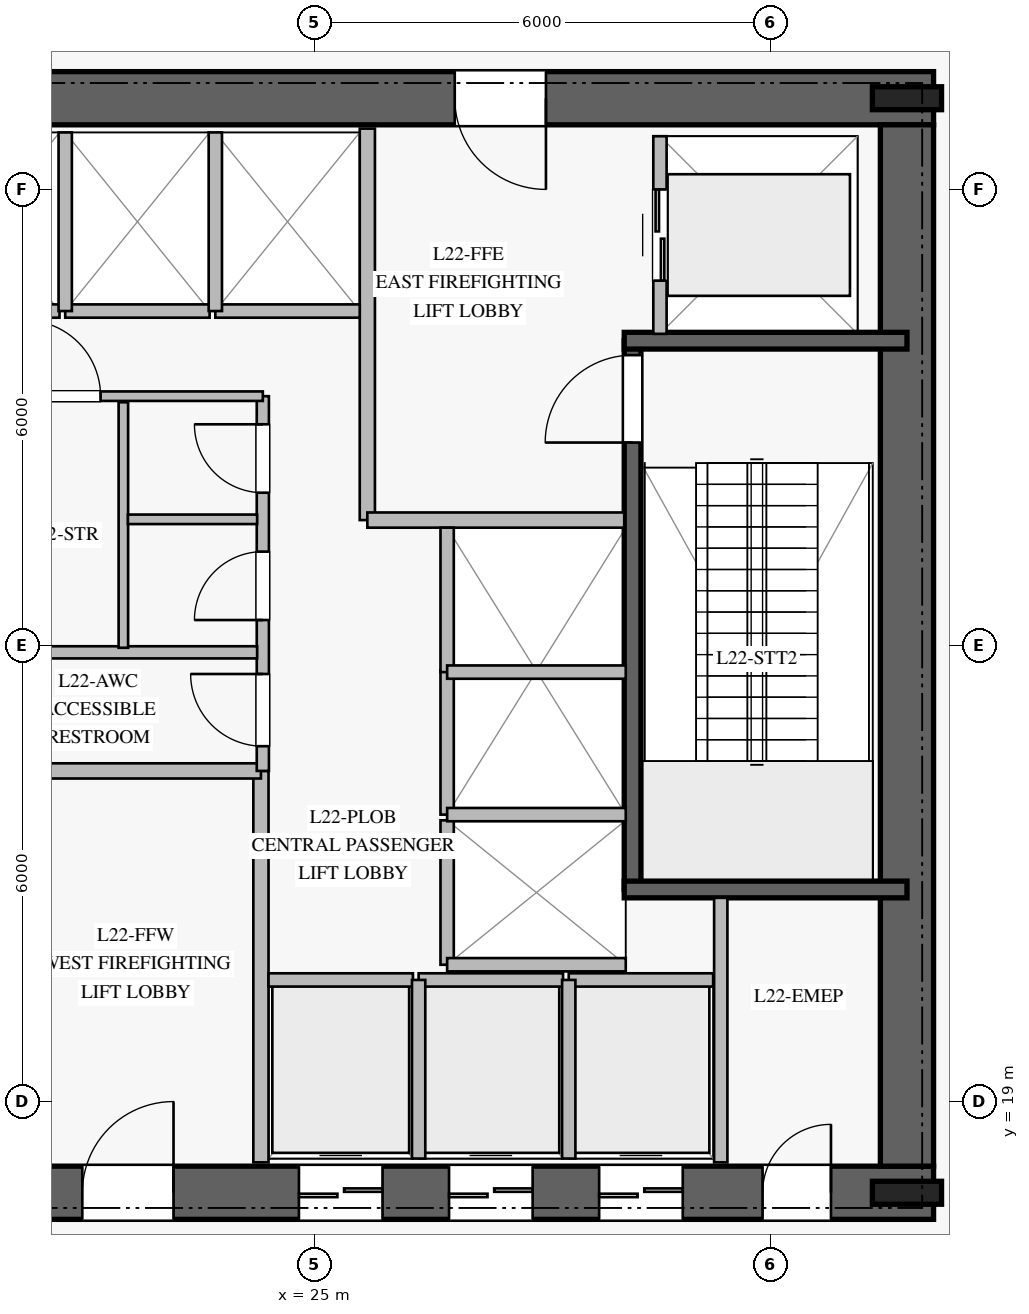
"""IFC4 building model, lengths in metres.
Left out: names, types, materials, properties, quantities, classifications, styles, units other than length and angle.
Written with IfcOpenShell. Run it as: python <this file> out.ifc"""

import sys

from ifc_helpers import new_model, si_unit, direction, frame, frame_2d, origin, origin_2d, place, context, subcontext, project, spatial, rectangle, i_section, extrude, element, fill, save


model = new_model("IFC4")
c1 = context("Model", 3, precision=1e-05, world=origin(), true_north=direction((0.0, 1.0)))
c2 = subcontext(c1, "Body", "Model", "MODEL_VIEW")
j1 = project(units=[si_unit("LENGTHUNIT", "METRE"), si_unit("PLANEANGLEUNIT", "RADIAN")], contexts=[c1])
p1 = place(None, origin())
s1 = spatial("IfcSite", under=j1, at=p1, CompositionType="ELEMENT")
p2 = place(p1, origin())
s2 = spatial("IfcBuilding", under=s1, at=p2, CompositionType="ELEMENT")
p3 = place(p2, frame((0.0, 0.0, 92.0)))
s3 = spatial("IfcBuildingStorey", under=s2, at=p3, CompositionType="ELEMENT", Elevation=92.0)
p4 = place(p3, frame((16.85, 17.8, 0.0), z_axis=(0.0, 0.0, 1.0), x_axis=(1.0, 0.0, 0.0)))
e1 = element("IfcWall", 1, at=p4, inside=s3, PredefinedType="SHEAR", context=c2, shape_type="SweptSolid", body=[
    extrude(rectangle(XDim=16.3, YDim=0.7, at=frame_2d((8.15, 0.0))), origin(), (0.0, 0.0, 1.0), 5.14),
])
p5 = place(p4, frame((5.1, 0.0, 0.0)))
e2 = element("IfcOpeningElement", 2, at=p5, cuts=e1, PredefinedType="OPENING", context=c2, shape_type="SweptSolid", body=[
    extrude(rectangle(XDim=1.2, YDim=2.25, at=frame_2d((0.6, 1.125))), frame((0.0, 0.36, 0.0), z_axis=(0.0, -1.0, 0.0), x_axis=(1.0, 0.0, 0.0)), (0.0, 0.0, 1.0), 0.72),
])
p6 = place(p4, frame((14.05, 0.0, 0.0)))
e3 = element("IfcOpeningElement", 3, at=p6, cuts=e1, PredefinedType="OPENING", context=c2, shape_type="SweptSolid", body=[
    extrude(rectangle(XDim=0.9, YDim=2.1, at=frame_2d((0.45, 1.05))), frame((0.0, 0.36, 0.0), z_axis=(0.0, -1.0, 0.0), x_axis=(1.0, 0.0, 0.0)), (0.0, 0.0, 1.0), 0.72),
])
p7 = place(p4, frame((7.95, 0.0, 0.0)))
e4 = element("IfcOpeningElement", 4, at=p7, cuts=e1, PredefinedType="OPENING", context=c2, shape_type="SweptSolid", body=[
    extrude(rectangle(XDim=1.1, YDim=2.2, at=frame_2d((0.55, 1.1))), frame((0.0, 0.36, 0.0), z_axis=(0.0, -1.0, 0.0), x_axis=(1.0, 0.0, 0.0)), (0.0, 0.0, 1.0), 0.72),
])
p8 = place(p4, frame((9.925, 0.0, 0.0)))
e5 = element("IfcOpeningElement", 5, at=p8, cuts=e1, PredefinedType="OPENING", context=c2, shape_type="SweptSolid", body=[
    extrude(rectangle(XDim=1.1, YDim=2.2, at=frame_2d((0.55, 1.1))), frame((0.0, 0.36, 0.0), z_axis=(0.0, -1.0, 0.0), x_axis=(1.0, 0.0, 0.0)), (0.0, 0.0, 1.0), 0.72),
])
p9 = place(p4, frame((11.9, 0.0, 0.0)))
e6 = element("IfcOpeningElement", 6, at=p9, cuts=e1, PredefinedType="OPENING", context=c2, shape_type="SweptSolid", body=[
    extrude(rectangle(XDim=1.1, YDim=2.2, at=frame_2d((0.55, 1.1))), frame((0.0, 0.36, 0.0), z_axis=(0.0, -1.0, 0.0), x_axis=(1.0, 0.0, 0.0)), (0.0, 0.0, 1.0), 0.72),
])
p10 = place(p3, frame((33.15, 32.2, 0.0), z_axis=(0.0, 0.0, 1.0), x_axis=(-1.0, 0.0, 0.0)))
e7 = element("IfcWall", 7, at=p10, inside=s3, PredefinedType="SHEAR", context=c2, shape_type="SweptSolid", body=[
    extrude(rectangle(XDim=16.3, YDim=0.7, at=frame_2d((8.15, 0.0))), origin(), (0.0, 0.0, 1.0), 5.14),
])
p11 = place(p10, frame((5.1, 0.0, 0.0)))
e8 = element("IfcOpeningElement", 8, at=p11, cuts=e7, PredefinedType="OPENING", context=c2, shape_type="SweptSolid", body=[
    extrude(rectangle(XDim=1.2, YDim=2.25, at=frame_2d((0.6, 1.125))), frame((0.0, 0.36, 0.0), z_axis=(0.0, -1.0, 0.0), x_axis=(1.0, 0.0, 0.0)), (0.0, 0.0, 1.0), 0.72),
])
p12 = place(p3, frame((32.8, 18.15, 0.0), z_axis=(0.0, 0.0, 1.0), x_axis=(0.0, 1.0, 0.0)))
e9 = element("IfcWall", 9, at=p12, inside=s3, PredefinedType="SHEAR", context=c2, shape_type="SweptSolid", body=[
    extrude(rectangle(XDim=13.7, YDim=0.7, at=frame_2d((6.85, 0.0))), origin(), (0.0, 0.0, 1.0), 5.14),
])
for number, where, z_axis, x_axis in (
    (10, (32.8, 17.8, 0.0), (0.0, 0.0, 1.0), (1.0, 0.0, 0.0)),
    (11, (32.8, 32.2, 0.0), (0.0, 0.0, 1.0), (1.0, 0.0, 0.0)),
):
    element("IfcColumn", number, at=place(p3, frame(where, z_axis=z_axis, x_axis=x_axis)), inside=s3, PredefinedType="COLUMN", context=c2, shape_type="SweptSolid", body=[
        extrude(i_section(OverallWidth=0.302, OverallDepth=0.91, WebThickness=0.021, FlangeThickness=0.04, at=origin_2d()), origin(), (0.0, 0.0, 1.0), 5.4),
    ])
p13 = place(p3, frame((29.19, 21.79, 0.0), z_axis=(0.0, 0.0, 1.0), x_axis=(0.0, 1.0, 0.0)))
e12 = element("IfcWall", 12, at=p13, inside=s3, PredefinedType="SOLIDWALL", context=c2, shape_type="SweptSolid", body=[
    extrude(rectangle(XDim=7.22, YDim=0.22, at=frame_2d((3.61, 0.0))), origin(), (0.0, 0.0, 1.0), 5.14),
])
p14 = place(p13, frame((5.88, 0.0, 0.0)))
e13 = element("IfcOpeningElement", 13, at=p14, cuts=e12, PredefinedType="OPENING", context=c2, shape_type="SweptSolid", body=[
    extrude(rectangle(XDim=1.15, YDim=2.2, at=frame_2d((0.575, 1.1))), frame((0.0, 0.12, 0.0), z_axis=(0.0, -1.0, 0.0), x_axis=(1.0, 0.0, 0.0)), (0.0, 0.0, 1.0), 0.24),
])
for number, where, z_axis, x_axis in (
    (14, (29.08, 21.79, 0.0), (0.0, 0.0, 1.0), (1.0, 0.0, 0.0)),
    (15, (29.08, 29.01, 0.0), (0.0, 0.0, 1.0), (1.0, 0.0, 0.0)),
):
    element("IfcWall", number, at=place(p3, frame(where, z_axis=z_axis, x_axis=x_axis)), inside=s3, PredefinedType="SOLIDWALL", context=c2, shape_type="SweptSolid", body=[
        extrude(rectangle(XDim=3.72, YDim=0.22, at=frame_2d((1.86, 0.0))), origin(), (0.0, 0.0, 1.0), 5.14),
    ])
p15 = place(p3, frame((24.3, 18.2, 0.0), z_axis=(0.0, 0.0, 1.0), x_axis=(0.0, 1.0, 0.0)))
e16 = element("IfcWall", 16, at=p15, inside=s3, PredefinedType="PARTITIONING", context=c2, shape_type="SweptSolid", body=[
    extrude(rectangle(XDim=5.15, YDim=0.2, at=frame_2d((2.575, 0.0))), origin(), (0.0, 0.0, 1.0), 5.14),
])
p16 = place(p3, frame((20.92, 23.35, 0.0), z_axis=(0.0, 0.0, 1.0), x_axis=(1.0, 0.0, 0.0)))
e17 = element("IfcWall", 17, at=p16, inside=s3, PredefinedType="PARTITIONING", context=c2, shape_type="SweptSolid", body=[
    extrude(rectangle(XDim=3.38, YDim=0.2, at=frame_2d((1.69, 0.0))), origin(), (0.0, 0.0, 1.0), 5.14),
])
p17 = place(p3, frame((25.7, 26.65, 0.0), z_axis=(0.0, 0.0, 1.0), x_axis=(0.0, 1.0, 0.0)))
e18 = element("IfcWall", 18, at=p17, inside=s3, PredefinedType="PARTITIONING", context=c2, shape_type="SweptSolid", body=[
    extrude(rectangle(XDim=5.15, YDim=0.2, at=frame_2d((2.575, 0.0))), origin(), (0.0, 0.0, 1.0), 5.14),
])
p18 = place(p3, frame((25.7, 26.65, 0.0), z_axis=(0.0, 0.0, 1.0), x_axis=(1.0, 0.0, 0.0)))
e19 = element("IfcWall", 19, at=p18, inside=s3, PredefinedType="PARTITIONING", context=c2, shape_type="SweptSolid", body=[
    extrude(rectangle(XDim=3.38, YDim=0.2, at=frame_2d((1.69, 0.0))), origin(), (0.0, 0.0, 1.0), 5.14),
])
p19 = place(p3, frame((24.325, 23.35, 0.0), z_axis=(0.0, 0.0, 1.0), x_axis=(0.0, 1.0, 0.0)))
e20 = element("IfcWall", 20, at=p19, inside=s3, PredefinedType="PLUMBINGWALL", context=c2, shape_type="SweptSolid", body=[
    extrude(rectangle(XDim=4.93, YDim=0.16, at=frame_2d((2.465, 0.0))), origin(), (0.0, 0.0, 1.0), 5.14),
])
p20 = place(p19, frame((0.325, 0.0, 0.0)))
e21 = element("IfcOpeningElement", 21, at=p20, cuts=e20, PredefinedType="OPENING", context=c2, shape_type="SweptSolid", body=[
    extrude(rectangle(XDim=0.95, YDim=2.1, at=frame_2d((0.475, 1.05))), frame((0.0, 0.09, 0.0), z_axis=(0.0, -1.0, 0.0), x_axis=(1.0, 0.0, 0.0)), (0.0, 0.0, 1.0), 0.18),
])
p21 = place(p19, frame((1.985, 0.0, 0.0)))
e22 = element("IfcOpeningElement", 22, at=p21, cuts=e20, PredefinedType="OPENING", context=c2, shape_type="SweptSolid", body=[
    extrude(rectangle(XDim=0.9, YDim=2.1, at=frame_2d((0.45, 1.05))), frame((0.0, 0.09, 0.0), z_axis=(0.0, -1.0, 0.0), x_axis=(1.0, 0.0, 0.0)), (0.0, 0.0, 1.0), 0.18),
])
p22 = place(p19, frame((3.66, 0.0, 0.0)))
e23 = element("IfcOpeningElement", 23, at=p22, cuts=e20, PredefinedType="OPENING", context=c2, shape_type="SweptSolid", body=[
    extrude(rectangle(XDim=0.9, YDim=2.1, at=frame_2d((0.45, 1.05))), frame((0.0, 0.09, 0.0), z_axis=(0.0, -1.0, 0.0), x_axis=(1.0, 0.0, 0.0)), (0.0, 0.0, 1.0), 0.18),
])
p23 = place(p3, frame((20.92, 28.28, 0.0), z_axis=(0.0, 0.0, 1.0), x_axis=(1.0, 0.0, 0.0)))
e24 = element("IfcWall", 24, at=p23, inside=s3, PredefinedType="PARTITIONING", context=c2, shape_type="SweptSolid", body=[
    extrude(rectangle(XDim=3.405, YDim=0.125, at=frame_2d((1.703, 0.0))), origin(), (0.0, 0.0, 1.0), 5.14),
])
p24 = place(p23, frame((0.27, 0.0, 0.0)))
e25 = element("IfcOpeningElement", 25, at=p24, cuts=e24, PredefinedType="OPENING", context=c2, shape_type="SweptSolid", body=[
    extrude(rectangle(XDim=1.0, YDim=2.15, at=frame_2d((0.5, 1.075))), frame((0.0, 0.073, 0.0), z_axis=(0.0, -1.0, 0.0), x_axis=(1.0, 0.0, 0.0)), (0.0, 0.0, 1.0), 0.145),
])
p25 = place(p3, frame((20.95, 24.91, 0.0), z_axis=(0.0, 0.0, 1.0), x_axis=(1.0, 0.0, 0.0)))
e26 = element("IfcWall", 26, at=p25, inside=s3, PredefinedType="PLUMBINGWALL", context=c2, shape_type="SweptSolid", body=[
    extrude(rectangle(XDim=3.3, YDim=0.16, at=frame_2d((1.65, 0.0))), origin(), (0.0, 0.0, 1.0), 5.14),
])
p26 = place(p3, frame((22.49, 24.97, 0.0), z_axis=(0.0, 0.0, 1.0), x_axis=(0.0, 1.0, 0.0)))
e27 = element("IfcWall", 27, at=p26, inside=s3, PredefinedType="PARTITIONING", context=c2, shape_type="SweptSolid", body=[
    extrude(rectangle(XDim=3.23, YDim=0.125, at=frame_2d((1.615, 0.0))), origin(), (0.0, 0.0, 1.0), 5.14),
])
p27 = place(p3, frame((22.55, 26.66, 0.0), z_axis=(0.0, 0.0, 1.0), x_axis=(1.0, 0.0, 0.0)))
e28 = element("IfcWall", 28, at=p27, inside=s3, PredefinedType="PARTITIONING", context=c2, shape_type="SweptSolid", body=[
    extrude(rectangle(XDim=1.7, YDim=0.125, at=frame_2d((0.85, 0.0))), origin(), (0.0, 0.0, 1.0), 5.14),
])
p28 = place(p3, frame((30.35, 18.2, 0.0), z_axis=(0.0, 0.0, 1.0), x_axis=(0.0, 1.0, 0.0)))
e29 = element("IfcWall", 29, at=p28, inside=s3, PredefinedType="PARTITIONING", context=c2, shape_type="SweptSolid", body=[
    extrude(rectangle(XDim=3.48, YDim=0.175, at=frame_2d((1.74, 0.0))), origin(), (0.0, 0.0, 1.0), 5.14),
])
p29 = place(p3, frame((24.4, 20.6, 0.0), z_axis=(0.0, 0.0, 1.0), x_axis=(1.0, 0.0, 0.0)))
e30 = element("IfcWall", 30, at=p29, inside=s3, PredefinedType="PARTITIONING", context=c2, shape_type="SweptSolid", body=[
    extrude(rectangle(XDim=1.9, YDim=0.175, at=frame_2d((0.95, 0.0))), origin(), (0.0, 0.0, 1.0), 5.14),
])
p30 = place(p3, frame((26.375, 20.6, 0.0), z_axis=(0.0, 0.0, 1.0), x_axis=(1.0, 0.0, 0.0)))
e31 = element("IfcWall", 31, at=p30, inside=s3, PredefinedType="PARTITIONING", context=c2, shape_type="SweptSolid", body=[
    extrude(rectangle(XDim=1.9, YDim=0.175, at=frame_2d((0.95, 0.0))), origin(), (0.0, 0.0, 1.0), 5.14),
])
p31 = place(p3, frame((26.375, 18.25, 0.0), z_axis=(0.0, 0.0, 1.0), x_axis=(0.0, 1.0, 0.0)))
e32 = element("IfcWall", 32, at=p31, inside=s3, PredefinedType="PARTITIONING", context=c2, shape_type="SweptSolid", body=[
    extrude(rectangle(XDim=2.35, YDim=0.175, at=frame_2d((1.175, 0.0))), origin(), (0.0, 0.0, 1.0), 5.14),
])
p32 = place(p3, frame((28.35, 20.6, 0.0), z_axis=(0.0, 0.0, 1.0), x_axis=(1.0, 0.0, 0.0)))
e33 = element("IfcWall", 33, at=p32, inside=s3, PredefinedType="PARTITIONING", context=c2, shape_type="SweptSolid", body=[
    extrude(rectangle(XDim=1.9, YDim=0.175, at=frame_2d((0.95, 0.0))), origin(), (0.0, 0.0, 1.0), 5.14),
])
p33 = place(p3, frame((28.35, 18.25, 0.0), z_axis=(0.0, 0.0, 1.0), x_axis=(0.0, 1.0, 0.0)))
e34 = element("IfcWall", 34, at=p33, inside=s3, PredefinedType="PARTITIONING", context=c2, shape_type="SweptSolid", body=[
    extrude(rectangle(XDim=2.35, YDim=0.175, at=frame_2d((1.175, 0.0))), origin(), (0.0, 0.0, 1.0), 5.14),
])
for number, where, z_axis, x_axis in (
    (35, (19.75, 29.4, 0.0), (0.0, 0.0, 1.0), (1.0, 0.0, 0.0)),
    (36, (21.725, 29.4, 0.0), (0.0, 0.0, 1.0), (1.0, 0.0, 0.0)),
):
    element("IfcWall", number, at=place(p3, frame(where, z_axis=z_axis, x_axis=x_axis)), inside=s3, PredefinedType="PARTITIONING", context=c2, shape_type="SweptSolid", body=[
        extrude(rectangle(XDim=1.9, YDim=0.175, at=frame_2d((0.95, 0.0))), origin(), (0.0, 0.0, 1.0), 5.14),
    ])
p34 = place(p3, frame((21.725, 29.4, 0.0), z_axis=(0.0, 0.0, 1.0), x_axis=(0.0, 1.0, 0.0)))
e37 = element("IfcWall", 37, at=p34, inside=s3, PredefinedType="PARTITIONING", context=c2, shape_type="SweptSolid", body=[
    extrude(rectangle(XDim=2.35, YDim=0.175, at=frame_2d((1.175, 0.0))), origin(), (0.0, 0.0, 1.0), 5.14),
])
p35 = place(p3, frame((23.7, 29.4, 0.0), z_axis=(0.0, 0.0, 1.0), x_axis=(1.0, 0.0, 0.0)))
e38 = element("IfcWall", 38, at=p35, inside=s3, PredefinedType="PARTITIONING", context=c2, shape_type="SweptSolid", body=[
    extrude(rectangle(XDim=1.9, YDim=0.175, at=frame_2d((0.95, 0.0))), origin(), (0.0, 0.0, 1.0), 5.14),
])
p36 = place(p3, frame((23.7, 29.4, 0.0), z_axis=(0.0, 0.0, 1.0), x_axis=(0.0, 1.0, 0.0)))
e39 = element("IfcWall", 39, at=p36, inside=s3, PredefinedType="PARTITIONING", context=c2, shape_type="SweptSolid", body=[
    extrude(rectangle(XDim=2.35, YDim=0.175, at=frame_2d((1.175, 0.0))), origin(), (0.0, 0.0, 1.0), 5.14),
])
p37 = place(p3, frame((26.75, 20.8, 0.0), z_axis=(0.0, 0.0, 1.0), x_axis=(0.0, 1.0, 0.0)))
e40 = element("IfcWall", 40, at=p37, inside=s3, PredefinedType="PARTITIONING", context=c2, shape_type="SweptSolid", body=[
    extrude(rectangle(XDim=1.9, YDim=0.175, at=frame_2d((0.95, 0.0))), origin(), (0.0, 0.0, 1.0), 5.14),
])
p38 = place(p3, frame((26.75, 20.8, 0.0), z_axis=(0.0, 0.0, 1.0), x_axis=(1.0, 0.0, 0.0)))
e41 = element("IfcWall", 41, at=p38, inside=s3, PredefinedType="PARTITIONING", context=c2, shape_type="SweptSolid", body=[
    extrude(rectangle(XDim=2.35, YDim=0.175, at=frame_2d((1.175, 0.0))), origin(), (0.0, 0.0, 1.0), 5.14),
])
p39 = place(p3, frame((26.75, 22.775, 0.0), z_axis=(0.0, 0.0, 1.0), x_axis=(0.0, 1.0, 0.0)))
e42 = element("IfcWall", 42, at=p39, inside=s3, PredefinedType="PARTITIONING", context=c2, shape_type="SweptSolid", body=[
    extrude(rectangle(XDim=1.9, YDim=0.175, at=frame_2d((0.95, 0.0))), origin(), (0.0, 0.0, 1.0), 5.14),
])
p40 = place(p3, frame((26.75, 22.775, 0.0), z_axis=(0.0, 0.0, 1.0), x_axis=(1.0, 0.0, 0.0)))
e43 = element("IfcWall", 43, at=p40, inside=s3, PredefinedType="PARTITIONING", context=c2, shape_type="SweptSolid", body=[
    extrude(rectangle(XDim=2.35, YDim=0.175, at=frame_2d((1.175, 0.0))), origin(), (0.0, 0.0, 1.0), 5.14),
])
p41 = place(p3, frame((26.75, 24.65, 0.0), z_axis=(0.0, 0.0, 1.0), x_axis=(0.0, 1.0, 0.0)))
e44 = element("IfcWall", 44, at=p41, inside=s3, PredefinedType="PARTITIONING", context=c2, shape_type="SweptSolid", body=[
    extrude(rectangle(XDim=1.9, YDim=0.175, at=frame_2d((0.95, 0.0))), origin(), (0.0, 0.0, 1.0), 5.14),
])
p42 = place(p3, frame((26.75, 24.65, 0.0), z_axis=(0.0, 0.0, 1.0), x_axis=(1.0, 0.0, 0.0)))
e45 = element("IfcWall", 45, at=p42, inside=s3, PredefinedType="PARTITIONING", context=c2, shape_type="SweptSolid", body=[
    extrude(rectangle(XDim=2.35, YDim=0.175, at=frame_2d((1.175, 0.0))), origin(), (0.0, 0.0, 1.0), 5.14),
])
p43 = place(p3, frame((29.55, 29.1, 0.0), z_axis=(0.0, 0.0, 1.0), x_axis=(0.0, 1.0, 0.0)))
e46 = element("IfcWall", 46, at=p43, inside=s3, PredefinedType="PARTITIONING", context=c2, shape_type="SweptSolid", body=[
    extrude(rectangle(XDim=2.6, YDim=0.175, at=frame_2d((1.3, 0.0))), origin(), (0.0, 0.0, 1.0), 5.14),
])
p44 = place(p43, frame((0.7, 0.0, 0.0)))
e47 = element("IfcOpeningElement", 47, at=p44, cuts=e46, PredefinedType="OPENING", context=c2, shape_type="SweptSolid", body=[
    extrude(rectangle(XDim=1.2, YDim=2.2, at=frame_2d((0.6, 1.1))), frame((0.0, 0.098, 0.0), z_axis=(0.0, -1.0, 0.0), x_axis=(1.0, 0.0, 0.0)), (0.0, 0.0, 1.0), 0.195),
])
p45 = place(p14, origin())
e48 = element("IfcDoor", 48, at=p45, inside=s3, OperationType="SINGLE_SWING_LEFT", PredefinedType="DOOR", context=c2, shape_type="SweptSolid", body=[
    extrude(rectangle(XDim=1.15, YDim=2.2, at=frame_2d((0.575, 1.1))), frame((0.0, 0.025, 0.0), z_axis=(0.0, -1.0, 0.0), x_axis=(1.0, 0.0, 0.0)), (0.0, 0.0, 1.0), 0.05),
])
fill(e13, e48)
p46 = place(p5, origin())
e49 = element("IfcDoor", 49, at=p46, inside=s3, OperationType="SINGLE_SWING_RIGHT", PredefinedType="DOOR", context=c2, shape_type="SweptSolid", body=[
    extrude(rectangle(XDim=1.2, YDim=2.25, at=frame_2d((0.6, 1.125))), frame((0.0, 0.025, 0.0), z_axis=(0.0, -1.0, 0.0), x_axis=(1.0, 0.0, 0.0)), (0.0, 0.0, 1.0), 0.05),
])
fill(e2, e49)
p47 = place(p11, origin())
e50 = element("IfcDoor", 50, at=p47, inside=s3, OperationType="SINGLE_SWING_LEFT", PredefinedType="DOOR", context=c2, shape_type="SweptSolid", body=[
    extrude(rectangle(XDim=1.2, YDim=2.25, at=frame_2d((0.6, 1.125))), frame((0.0, 0.025, 0.0), z_axis=(0.0, -1.0, 0.0), x_axis=(1.0, 0.0, 0.0)), (0.0, 0.0, 1.0), 0.05),
])
fill(e8, e50)
p48 = place(p20, origin())
e51 = element("IfcDoor", 51, at=p48, inside=s3, OperationType="SINGLE_SWING_RIGHT", PredefinedType="DOOR", context=c2, shape_type="SweptSolid", body=[
    extrude(rectangle(XDim=0.95, YDim=2.1, at=frame_2d((0.475, 1.05))), frame((0.0, 0.025, 0.0), z_axis=(0.0, -1.0, 0.0), x_axis=(1.0, 0.0, 0.0)), (0.0, 0.0, 1.0), 0.05),
])
fill(e21, e51)
p49 = place(p21, origin())
e52 = element("IfcDoor", 52, at=p49, inside=s3, OperationType="SINGLE_SWING_LEFT", PredefinedType="DOOR", context=c2, shape_type="SweptSolid", body=[
    extrude(rectangle(XDim=0.9, YDim=2.1, at=frame_2d((0.45, 1.05))), frame((0.0, 0.025, 0.0), z_axis=(0.0, -1.0, 0.0), x_axis=(1.0, 0.0, 0.0)), (0.0, 0.0, 1.0), 0.05),
])
fill(e22, e52)
p50 = place(p22, origin())
e53 = element("IfcDoor", 53, at=p50, inside=s3, OperationType="SINGLE_SWING_RIGHT", PredefinedType="DOOR", context=c2, shape_type="SweptSolid", body=[
    extrude(rectangle(XDim=0.9, YDim=2.1, at=frame_2d((0.45, 1.05))), frame((0.0, 0.025, 0.0), z_axis=(0.0, -1.0, 0.0), x_axis=(1.0, 0.0, 0.0)), (0.0, 0.0, 1.0), 0.05),
])
fill(e23, e53)
p51 = place(p24, origin())
e54 = element("IfcDoor", 54, at=p51, inside=s3, OperationType="SINGLE_SWING_LEFT", PredefinedType="DOOR", context=c2, shape_type="SweptSolid", body=[
    extrude(rectangle(XDim=1.0, YDim=2.15, at=frame_2d((0.5, 1.075))), frame((0.0, 0.025, 0.0), z_axis=(0.0, -1.0, 0.0), x_axis=(1.0, 0.0, 0.0)), (0.0, 0.0, 1.0), 0.05),
])
fill(e25, e54)
p52 = place(p6, origin())
e55 = element("IfcDoor", 55, at=p52, inside=s3, OperationType="SINGLE_SWING_RIGHT", PredefinedType="DOOR", context=c2, shape_type="SweptSolid", body=[
    extrude(rectangle(XDim=0.9, YDim=2.1, at=frame_2d((0.45, 1.05))), frame((0.0, 0.025, 0.0), z_axis=(0.0, -1.0, 0.0), x_axis=(1.0, 0.0, 0.0)), (0.0, 0.0, 1.0), 0.05),
])
fill(e3, e55)
p53 = place(p7, origin())
e56 = element("IfcDoor", 56, at=p53, inside=s3, OperationType="DOUBLE_DOOR_SLIDING", PredefinedType="DOOR", context=c2, shape_type="SweptSolid", body=[
    extrude(rectangle(XDim=1.1, YDim=2.2, at=frame_2d((0.55, 1.1))), frame((0.0, 0.025, 0.0), z_axis=(0.0, -1.0, 0.0), x_axis=(1.0, 0.0, 0.0)), (0.0, 0.0, 1.0), 0.05),
])
fill(e4, e56)
p54 = place(p8, origin())
e57 = element("IfcDoor", 57, at=p54, inside=s3, OperationType="DOUBLE_DOOR_SLIDING", PredefinedType="DOOR", context=c2, shape_type="SweptSolid", body=[
    extrude(rectangle(XDim=1.1, YDim=2.2, at=frame_2d((0.55, 1.1))), frame((0.0, 0.025, 0.0), z_axis=(0.0, -1.0, 0.0), x_axis=(1.0, 0.0, 0.0)), (0.0, 0.0, 1.0), 0.05),
])
fill(e5, e57)
p55 = place(p9, origin())
e58 = element("IfcDoor", 58, at=p55, inside=s3, OperationType="DOUBLE_DOOR_SLIDING", PredefinedType="DOOR", context=c2, shape_type="SweptSolid", body=[
    extrude(rectangle(XDim=1.1, YDim=2.2, at=frame_2d((0.55, 1.1))), frame((0.0, 0.025, 0.0), z_axis=(0.0, -1.0, 0.0), x_axis=(1.0, 0.0, 0.0)), (0.0, 0.0, 1.0), 0.05),
])
fill(e6, e58)
p56 = place(p44, origin())
e59 = element("IfcDoor", 59, at=p56, inside=s3, OperationType="DOUBLE_DOOR_SLIDING", PredefinedType="DOOR", context=c2, shape_type="SweptSolid", body=[
    extrude(rectangle(XDim=1.2, YDim=2.2, at=frame_2d((0.6, 1.1))), frame((0.0, 0.025, 0.0), z_axis=(0.0, -1.0, 0.0), x_axis=(1.0, 0.0, 0.0)), (0.0, 0.0, 1.0), 0.05),
])
fill(e47, e59)
save(model, sys.argv[1])
